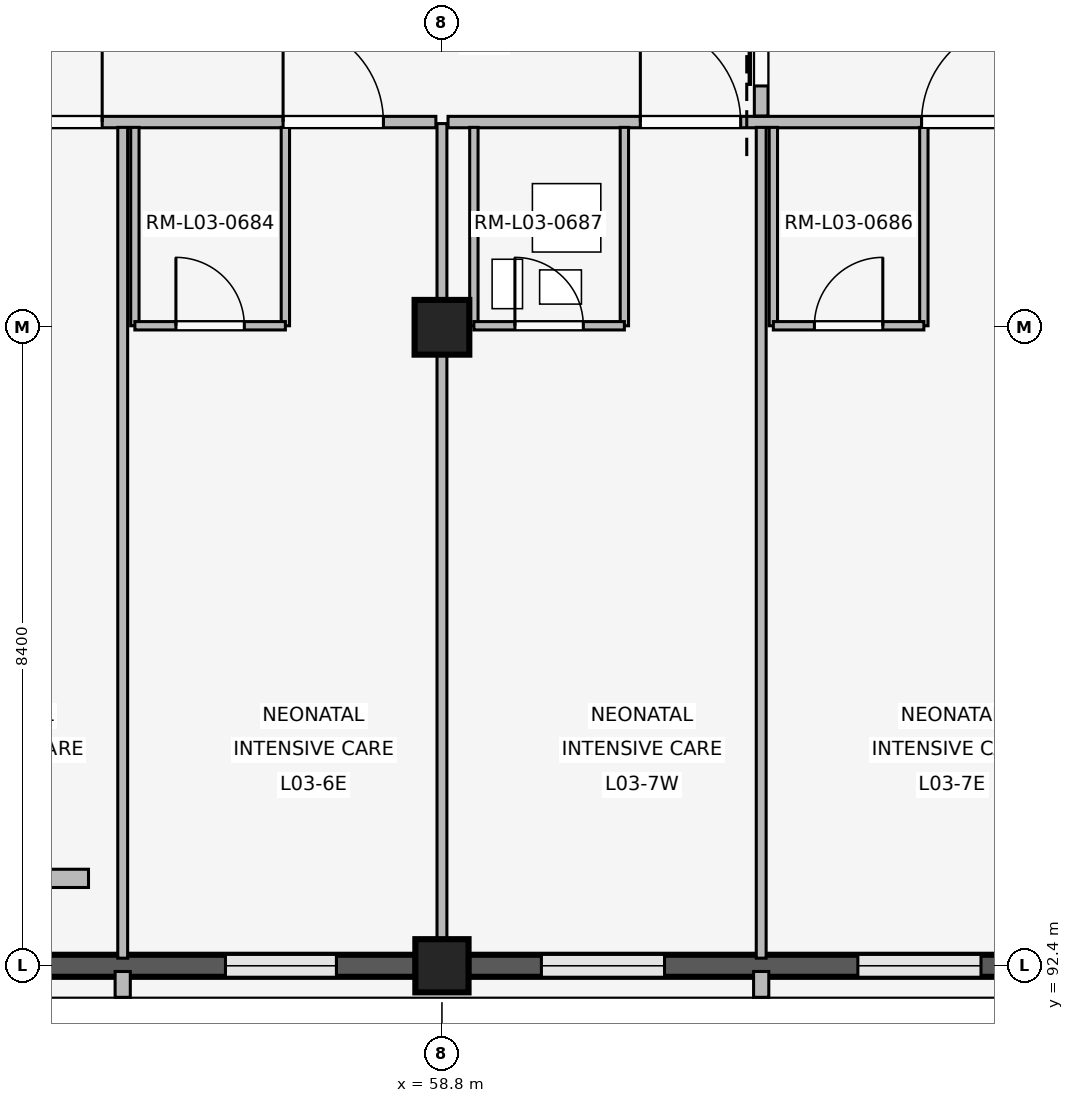
"""IFC4 building model, lengths in metres.
Left out: names, types, materials, properties, quantities, classifications, styles, units other than length and angle.
Written with IfcOpenShell. Run it as: python <this file> out.ifc"""

import sys

from ifc_helpers import new_model, si_unit, direction, frame, frame_2d, origin, origin_2d, place, context, subcontext, project, spatial, rectangle, extrude, element, fill, save


model = new_model("IFC4")
c1 = context("Model", 3, precision=1e-05, world=origin(), true_north=direction((0.0, 1.0)))
c2 = subcontext(c1, "Body", "Model", "MODEL_VIEW")
j1 = project(units=[si_unit("LENGTHUNIT", "METRE"), si_unit("PLANEANGLEUNIT", "RADIAN")], contexts=[c1])
p1 = place(None, origin())
s1 = spatial("IfcSite", under=j1, at=p1, CompositionType="ELEMENT")
p2 = place(p1, origin())
s2 = spatial("IfcBuilding", under=s1, at=p2, CompositionType="ELEMENT")
p3 = place(p2, frame((0.0, 0.0, 12.9)))
s3 = spatial("IfcBuildingStorey", under=s2, at=p3, CompositionType="ELEMENT", Elevation=12.9)
p4 = place(p3, frame((58.8, 92.4, 0.0), z_axis=(0.0, 0.0, 1.0), x_axis=(1.0, 0.0, 0.0)))
e1 = element("IfcColumn", 1, at=p4, inside=s3, PredefinedType="COLUMN", context=c2, shape_type="SweptSolid", body=[
    extrude(rectangle(XDim=0.7, YDim=0.7, at=origin_2d()), origin(), (0.0, 0.0, 1.0), 3.3),
])
p5 = place(p3, frame((58.8, 100.8, 0.0), z_axis=(0.0, 0.0, 1.0), x_axis=(1.0, 0.0, 0.0)))
e2 = element("IfcColumn", 2, at=p5, inside=s3, PredefinedType="COLUMN", context=c2, shape_type="SweptSolid", body=[
    extrude(rectangle(XDim=0.72, YDim=0.72, at=origin_2d()), origin(), (0.0, 0.0, 1.0), 3.3),
])
p6 = place(p3, frame((58.455, 92.4, 0.0), z_axis=(0.0, 0.0, 1.0), x_axis=(-1.0, 0.0, 0.0)))
e3 = element("IfcWall", 3, at=p6, inside=s3, PredefinedType="SOLIDWALL", context=c2, shape_type="SweptSolid", body=[
    extrude(rectangle(XDim=7.71, YDim=0.29, at=frame_2d((3.855, 0.0))), origin(), (0.0, 0.0, 1.0), 2.44),
])
p7 = place(p6, frame((1.043, 0.0, 0.85)))
e4 = element("IfcOpeningElement", 4, at=p7, cuts=e3, PredefinedType="OPENING", context=c2, shape_type="SweptSolid", body=[
    extrude(rectangle(XDim=1.46, YDim=0.85, at=frame_2d((0.73, 0.425))), frame((0.0, 0.155, 0.0), z_axis=(0.0, -1.0, 0.0), x_axis=(1.0, 0.0, 0.0)), (0.0, 0.0, 1.0), 0.31),
])
p8 = place(p6, frame((5.207, 0.0, 0.85)))
e5 = element("IfcOpeningElement", 5, at=p8, cuts=e3, PredefinedType="OPENING", context=c2, shape_type="SweptSolid", body=[
    extrude(rectangle(XDim=1.46, YDim=0.85, at=frame_2d((0.73, 0.425))), frame((0.0, 0.155, 0.0), z_axis=(0.0, -1.0, 0.0), x_axis=(1.0, 0.0, 0.0)), (0.0, 0.0, 1.0), 0.31),
])
p9 = place(p3, frame((54.6, 92.325, 0.0), z_axis=(0.0, 0.0, 1.0), x_axis=(0.0, -1.0, 0.0)))
e6 = element("IfcWall", 6, at=p9, inside=s3, PredefinedType="ELEMENTEDWALL", context=c2, shape_type="SweptSolid", body=[
    extrude(rectangle(XDim=0.34, YDim=0.2, at=frame_2d((0.17, 0.0))), origin(), (0.0, 0.0, 1.0), 2.42),
])
p10 = place(p3, frame((66.855, 92.4, 0.0), z_axis=(0.0, 0.0, 1.0), x_axis=(-1.0, 0.0, 0.0)))
e7 = element("IfcWall", 7, at=p10, inside=s3, PredefinedType="SOLIDWALL", context=c2, shape_type="SweptSolid", body=[
    extrude(rectangle(XDim=7.71, YDim=0.29, at=frame_2d((3.855, 0.0))), origin(), (0.0, 0.0, 1.0), 2.44),
])
p11 = place(p10, frame((0.963, 0.0, 0.85)))
e8 = element("IfcOpeningElement", 8, at=p11, cuts=e7, PredefinedType="OPENING", context=c2, shape_type="SweptSolid", body=[
    extrude(rectangle(XDim=1.62, YDim=0.95, at=frame_2d((0.81, 0.475))), frame((0.0, 0.155, 0.0), z_axis=(0.0, -1.0, 0.0), x_axis=(1.0, 0.0, 0.0)), (0.0, 0.0, 1.0), 0.31),
])
p12 = place(p10, frame((5.127, 0.0, 0.85)))
e9 = element("IfcOpeningElement", 9, at=p12, cuts=e7, PredefinedType="OPENING", context=c2, shape_type="SweptSolid", body=[
    extrude(rectangle(XDim=1.62, YDim=0.95, at=frame_2d((0.81, 0.475))), frame((0.0, 0.155, 0.0), z_axis=(0.0, -1.0, 0.0), x_axis=(1.0, 0.0, 0.0)), (0.0, 0.0, 1.0), 0.31),
])
p13 = place(p3, frame((63.0, 92.325, 0.0), z_axis=(0.0, 0.0, 1.0), x_axis=(0.0, -1.0, 0.0)))
e10 = element("IfcWall", 10, at=p13, inside=s3, PredefinedType="ELEMENTEDWALL", context=c2, shape_type="SweptSolid", body=[
    extrude(rectangle(XDim=0.34, YDim=0.2, at=frame_2d((0.17, 0.0))), origin(), (0.0, 0.0, 1.0), 2.42),
])
p14 = place(p3, frame((50.76, 103.5, 0.0), z_axis=(0.0, 0.0, 1.0), x_axis=(1.0, 0.0, 0.0)))
e11 = element("IfcWall", 11, at=p14, inside=s3, PredefinedType="PARTITIONING", context=c2, shape_type="SweptSolid", body=[
    extrude(rectangle(XDim=7.96, YDim=0.15, at=frame_2d((3.98, 0.0))), origin(), (0.0, 0.0, 1.0), 2.42),
])
p15 = place(p14, frame((2.25, 0.0, 0.0)))
e12 = element("IfcOpeningElement", 12, at=p15, cuts=e11, PredefinedType="OPENING", context=c2, shape_type="SweptSolid", body=[
    extrude(rectangle(XDim=1.32, YDim=2.25, at=frame_2d((0.66, 1.125))), frame((0.0, 0.085, 0.0), z_axis=(0.0, -1.0, 0.0), x_axis=(1.0, 0.0, 0.0)), (0.0, 0.0, 1.0), 0.17),
])
p16 = place(p14, frame((5.95, 0.0, 0.0)))
e13 = element("IfcOpeningElement", 13, at=p16, cuts=e11, PredefinedType="OPENING", context=c2, shape_type="SweptSolid", body=[
    extrude(rectangle(XDim=1.32, YDim=2.25, at=frame_2d((0.66, 1.125))), frame((0.0, 0.085, 0.0), z_axis=(0.0, -1.0, 0.0), x_axis=(1.0, 0.0, 0.0)), (0.0, 0.0, 1.0), 0.17),
])
p17 = place(p3, frame((54.6, 92.5, 0.0), z_axis=(0.0, 0.0, 1.0), x_axis=(0.0, 1.0, 0.0)))
e14 = element("IfcWall", 14, at=p17, inside=s3, PredefinedType="PARTITIONING", context=c2, shape_type="SweptSolid", body=[
    extrude(rectangle(XDim=10.93, YDim=0.13, at=frame_2d((5.465, 0.0))), origin(), (0.0, 0.0, 1.0), 2.42),
])
for number, where, z_axis, x_axis in (
    (15, (54.76, 100.82, 0.0), (0.0, 0.0, 1.0), (0.0, 1.0, 0.0)),
    (16, (56.74, 100.82, 0.0), (0.0, 0.0, 1.0), (0.0, 1.0, 0.0)),
):
    element("IfcWall", number, at=place(p3, frame(where, z_axis=z_axis, x_axis=x_axis)), inside=s3, PredefinedType="PARTITIONING", context=c2, shape_type="SweptSolid", body=[
        extrude(rectangle(XDim=2.61, YDim=0.11, at=frame_2d((1.305, 0.0))), origin(), (0.0, 0.0, 1.0), 2.42),
    ])
p18 = place(p3, frame((54.76, 100.82, 0.0), z_axis=(0.0, 0.0, 1.0), x_axis=(1.0, 0.0, 0.0)))
e17 = element("IfcWall", 17, at=p18, inside=s3, PredefinedType="PARTITIONING", context=c2, shape_type="SweptSolid", body=[
    extrude(rectangle(XDim=1.98, YDim=0.11, at=frame_2d((0.99, 0.0))), origin(), (0.0, 0.0, 1.0), 2.42),
])
p19 = place(p18, frame((0.54, 0.0, 0.0)))
e18 = element("IfcOpeningElement", 18, at=p19, cuts=e17, PredefinedType="OPENING", context=c2, shape_type="SweptSolid", body=[
    extrude(rectangle(XDim=0.9, YDim=2.1, at=frame_2d((0.45, 1.05))), frame((0.0, 0.065, 0.0), z_axis=(0.0, -1.0, 0.0), x_axis=(1.0, 0.0, 0.0)), (0.0, 0.0, 1.0), 0.13),
])
p20 = place(p3, frame((53.25, 93.55, 0.0), z_axis=(0.0, 0.0, 1.0), x_axis=(1.0, 0.0, 0.0)))
e19 = element("IfcWall", 19, at=p20, inside=s3, PredefinedType="PLUMBINGWALL", context=c2, shape_type="SweptSolid", body=[
    extrude(rectangle(XDim=0.9, YDim=0.24, at=frame_2d((0.45, 0.0))), origin(), (0.0, 0.0, 1.0), 2.42),
])
p21 = place(p3, frame((58.8, 92.54, 0.0), z_axis=(0.0, 0.0, 1.0), x_axis=(0.0, 1.0, 0.0)))
e20 = element("IfcWall", 20, at=p21, inside=s3, PredefinedType="PARTITIONING", context=c2, shape_type="SweptSolid", body=[
    extrude(rectangle(XDim=10.94, YDim=0.13, at=frame_2d((5.47, 0.0))), origin(), (0.0, 0.0, 1.0), 2.42),
])
p22 = place(p3, frame((58.88, 103.5, 0.0), z_axis=(0.0, 0.0, 1.0), x_axis=(1.0, 0.0, 0.0)))
e21 = element("IfcWall", 21, at=p22, inside=s3, PredefinedType="PARTITIONING", context=c2, shape_type="SweptSolid", body=[
    extrude(rectangle(XDim=8.24, YDim=0.15, at=frame_2d((4.12, 0.0))), origin(), (0.0, 0.0, 1.0), 2.42),
])
p23 = place(p22, frame((2.53, 0.0, 0.0)))
e22 = element("IfcOpeningElement", 22, at=p23, cuts=e21, PredefinedType="OPENING", context=c2, shape_type="SweptSolid", body=[
    extrude(rectangle(XDim=1.32, YDim=2.25, at=frame_2d((0.66, 1.125))), frame((0.0, 0.085, 0.0), z_axis=(0.0, -1.0, 0.0), x_axis=(1.0, 0.0, 0.0)), (0.0, 0.0, 1.0), 0.17),
])
p24 = place(p22, frame((6.23, 0.0, 0.0)))
e23 = element("IfcOpeningElement", 23, at=p24, cuts=e21, PredefinedType="OPENING", context=c2, shape_type="SweptSolid", body=[
    extrude(rectangle(XDim=1.32, YDim=2.25, at=frame_2d((0.66, 1.125))), frame((0.0, 0.085, 0.0), z_axis=(0.0, -1.0, 0.0), x_axis=(1.0, 0.0, 0.0)), (0.0, 0.0, 1.0), 0.17),
])
p25 = place(p3, frame((63.0, 92.5, 0.0), z_axis=(0.0, 0.0, 1.0), x_axis=(0.0, 1.0, 0.0)))
e24 = element("IfcWall", 24, at=p25, inside=s3, PredefinedType="PARTITIONING", context=c2, shape_type="SweptSolid", body=[
    extrude(rectangle(XDim=10.93, YDim=0.13, at=frame_2d((5.465, 0.0))), origin(), (0.0, 0.0, 1.0), 2.42),
])
for number, where, z_axis, x_axis in (
    (25, (59.22, 100.82, 0.0), (0.0, 0.0, 1.0), (0.0, 1.0, 0.0)),
    (26, (61.2, 100.82, 0.0), (0.0, 0.0, 1.0), (0.0, 1.0, 0.0)),
):
    element("IfcWall", number, at=place(p3, frame(where, z_axis=z_axis, x_axis=x_axis)), inside=s3, PredefinedType="PARTITIONING", context=c2, shape_type="SweptSolid", body=[
        extrude(rectangle(XDim=2.61, YDim=0.11, at=frame_2d((1.305, 0.0))), origin(), (0.0, 0.0, 1.0), 2.42),
    ])
p26 = place(p3, frame((59.22, 100.82, 0.0), z_axis=(0.0, 0.0, 1.0), x_axis=(1.0, 0.0, 0.0)))
e27 = element("IfcWall", 27, at=p26, inside=s3, PredefinedType="PARTITIONING", context=c2, shape_type="SweptSolid", body=[
    extrude(rectangle(XDim=1.98, YDim=0.11, at=frame_2d((0.99, 0.0))), origin(), (0.0, 0.0, 1.0), 2.42),
])
p27 = place(p26, frame((0.54, 0.0, 0.0)))
e28 = element("IfcOpeningElement", 28, at=p27, cuts=e27, PredefinedType="OPENING", context=c2, shape_type="SweptSolid", body=[
    extrude(rectangle(XDim=0.9, YDim=2.1, at=frame_2d((0.45, 1.05))), frame((0.0, 0.065, 0.0), z_axis=(0.0, -1.0, 0.0), x_axis=(1.0, 0.0, 0.0)), (0.0, 0.0, 1.0), 0.13),
])
for number, where, z_axis, x_axis in (
    (29, (63.16, 100.82, 0.0), (0.0, 0.0, 1.0), (0.0, 1.0, 0.0)),
    (30, (65.14, 100.82, 0.0), (0.0, 0.0, 1.0), (0.0, 1.0, 0.0)),
):
    element("IfcWall", number, at=place(p3, frame(where, z_axis=z_axis, x_axis=x_axis)), inside=s3, PredefinedType="PARTITIONING", context=c2, shape_type="SweptSolid", body=[
        extrude(rectangle(XDim=2.61, YDim=0.11, at=frame_2d((1.305, 0.0))), origin(), (0.0, 0.0, 1.0), 2.42),
    ])
p28 = place(p3, frame((63.16, 100.82, 0.0), z_axis=(0.0, 0.0, 1.0), x_axis=(1.0, 0.0, 0.0)))
e31 = element("IfcWall", 31, at=p28, inside=s3, PredefinedType="PARTITIONING", context=c2, shape_type="SweptSolid", body=[
    extrude(rectangle(XDim=1.98, YDim=0.11, at=frame_2d((0.99, 0.0))), origin(), (0.0, 0.0, 1.0), 2.42),
])
p29 = place(p28, frame((0.54, 0.0, 0.0)))
e32 = element("IfcOpeningElement", 32, at=p29, cuts=e31, PredefinedType="OPENING", context=c2, shape_type="SweptSolid", body=[
    extrude(rectangle(XDim=0.9, YDim=2.1, at=frame_2d((0.45, 1.05))), frame((0.0, 0.065, 0.0), z_axis=(0.0, -1.0, 0.0), x_axis=(1.0, 0.0, 0.0)), (0.0, 0.0, 1.0), 0.13),
])
p30 = place(p3, frame((63.0, 103.58, 0.0), z_axis=(0.0, 0.0, 1.0), x_axis=(0.0, 1.0, 0.0)))
e33 = element("IfcWall", 33, at=p30, inside=s3, PredefinedType="PARTITIONING", context=c2, shape_type="SweptSolid", body=[
    extrude(rectangle(XDim=2.84, YDim=0.18, at=frame_2d((1.42, 0.0))), origin(), (0.0, 0.0, 1.0), 2.42),
])
p31 = place(p30, frame((0.395, 0.0, 0.0)))
e34 = element("IfcOpeningElement", 34, at=p31, cuts=e33, PredefinedType="OPENING", context=c2, shape_type="SweptSolid", body=[
    extrude(rectangle(XDim=2.05, YDim=2.35, at=frame_2d((1.025, 1.175))), frame((0.0, 0.1, 0.0), z_axis=(0.0, -1.0, 0.0), x_axis=(1.0, 0.0, 0.0)), (0.0, 0.0, 1.0), 0.2),
])
p32 = place(p7, origin())
e35 = element("IfcWindow", 35, at=p32, inside=s3, PartitioningType="SINGLE_PANEL", PredefinedType="WINDOW", context=c2, shape_type="SweptSolid", body=[
    extrude(rectangle(XDim=1.46, YDim=0.85, at=frame_2d((0.73, 0.425))), frame((0.0, 0.03, 0.0), z_axis=(0.0, -1.0, 0.0), x_axis=(1.0, 0.0, 0.0)), (0.0, 0.0, 1.0), 0.06),
])
fill(e4, e35)
p33 = place(p11, origin())
e36 = element("IfcWindow", 36, at=p33, inside=s3, PartitioningType="SINGLE_PANEL", PredefinedType="WINDOW", context=c2, shape_type="SweptSolid", body=[
    extrude(rectangle(XDim=1.62, YDim=0.95, at=frame_2d((0.81, 0.475))), frame((0.0, 0.03, 0.0), z_axis=(0.0, -1.0, 0.0), x_axis=(1.0, 0.0, 0.0)), (0.0, 0.0, 1.0), 0.06),
])
fill(e8, e36)
p34 = place(p12, origin())
e37 = element("IfcWindow", 37, at=p34, inside=s3, PartitioningType="SINGLE_PANEL", PredefinedType="WINDOW", context=c2, shape_type="SweptSolid", body=[
    extrude(rectangle(XDim=1.62, YDim=0.95, at=frame_2d((0.81, 0.475))), frame((0.0, 0.03, 0.0), z_axis=(0.0, -1.0, 0.0), x_axis=(1.0, 0.0, 0.0)), (0.0, 0.0, 1.0), 0.06),
])
fill(e9, e37)
p35 = place(p15, origin())
e38 = element("IfcDoor", 38, at=p35, inside=s3, OperationType="SINGLE_SWING_RIGHT", PredefinedType="DOOR", context=c2, shape_type="SweptSolid", body=[
    extrude(rectangle(XDim=1.32, YDim=2.25, at=frame_2d((0.66, 1.125))), frame((0.0, 0.025, 0.0), z_axis=(0.0, -1.0, 0.0), x_axis=(1.0, 0.0, 0.0)), (0.0, 0.0, 1.0), 0.05),
])
fill(e12, e38)
p36 = place(p16, origin())
e39 = element("IfcDoor", 39, at=p36, inside=s3, OperationType="SINGLE_SWING_LEFT", PredefinedType="DOOR", context=c2, shape_type="SweptSolid", body=[
    extrude(rectangle(XDim=1.32, YDim=2.25, at=frame_2d((0.66, 1.125))), frame((0.0, 0.025, 0.0), z_axis=(0.0, -1.0, 0.0), x_axis=(1.0, 0.0, 0.0)), (0.0, 0.0, 1.0), 0.05),
])
fill(e13, e39)
p37 = place(p19, origin())
e40 = element("IfcDoor", 40, at=p37, inside=s3, OperationType="SINGLE_SWING_LEFT", PredefinedType="DOOR", context=c2, shape_type="SweptSolid", body=[
    extrude(rectangle(XDim=0.9, YDim=2.1, at=frame_2d((0.45, 1.05))), frame((0.0, 0.025, 0.0), z_axis=(0.0, -1.0, 0.0), x_axis=(1.0, 0.0, 0.0)), (0.0, 0.0, 1.0), 0.05),
])
fill(e18, e40)
p38 = place(p23, origin())
e41 = element("IfcDoor", 41, at=p38, inside=s3, OperationType="SINGLE_SWING_LEFT", PredefinedType="DOOR", context=c2, shape_type="SweptSolid", body=[
    extrude(rectangle(XDim=1.32, YDim=2.25, at=frame_2d((0.66, 1.125))), frame((0.0, 0.025, 0.0), z_axis=(0.0, -1.0, 0.0), x_axis=(1.0, 0.0, 0.0)), (0.0, 0.0, 1.0), 0.05),
])
fill(e22, e41)
p39 = place(p24, origin())
e42 = element("IfcDoor", 42, at=p39, inside=s3, OperationType="SINGLE_SWING_RIGHT", PredefinedType="DOOR", context=c2, shape_type="SweptSolid", body=[
    extrude(rectangle(XDim=1.32, YDim=2.25, at=frame_2d((0.66, 1.125))), frame((0.0, 0.025, 0.0), z_axis=(0.0, -1.0, 0.0), x_axis=(1.0, 0.0, 0.0)), (0.0, 0.0, 1.0), 0.05),
])
fill(e23, e42)
p40 = place(p27, origin())
e43 = element("IfcDoor", 43, at=p40, inside=s3, OperationType="SINGLE_SWING_LEFT", PredefinedType="DOOR", context=c2, shape_type="SweptSolid", body=[
    extrude(rectangle(XDim=0.9, YDim=2.1, at=frame_2d((0.45, 1.05))), frame((0.0, 0.025, 0.0), z_axis=(0.0, -1.0, 0.0), x_axis=(1.0, 0.0, 0.0)), (0.0, 0.0, 1.0), 0.05),
])
fill(e28, e43)
p41 = place(p29, origin())
e44 = element("IfcDoor", 44, at=p41, inside=s3, OperationType="SINGLE_SWING_RIGHT", PredefinedType="DOOR", context=c2, shape_type="SweptSolid", body=[
    extrude(rectangle(XDim=0.9, YDim=2.1, at=frame_2d((0.45, 1.05))), frame((0.0, 0.025, 0.0), z_axis=(0.0, -1.0, 0.0), x_axis=(1.0, 0.0, 0.0)), (0.0, 0.0, 1.0), 0.05),
])
fill(e32, e44)
p42 = place(p31, origin())
e45 = element("IfcDoor", 45, at=p42, inside=s3, OperationType="SLIDING_TO_LEFT", PredefinedType="DOOR", context=c2, shape_type="SweptSolid", body=[
    extrude(rectangle(XDim=2.05, YDim=2.35, at=frame_2d((1.025, 1.175))), frame((0.0, 0.025, 0.0), z_axis=(0.0, -1.0, 0.0), x_axis=(1.0, 0.0, 0.0)), (0.0, 0.0, 1.0), 0.05),
])
fill(e34, e45)
save(model, sys.argv[1])
